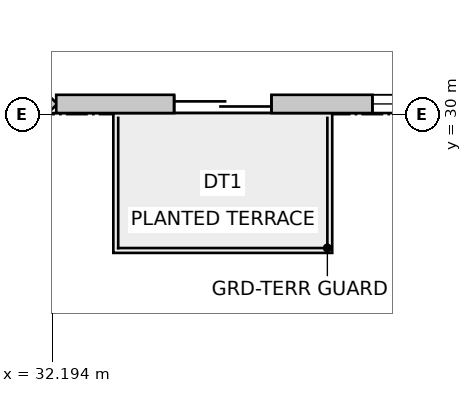
"""IFC4 building model, lengths in metres.
Left out: names, types, materials, properties, quantities, classifications, styles, units other than length and angle.
Written with IfcOpenShell. Run it as: python <this file> out.ifc"""

import sys

from ifc_helpers import new_model, si_unit, direction, frame, frame_2d, origin, place, context, subcontext, project, spatial, rectangle, extrude, source, transform, mapped, element, fill, save


model = new_model("IFC4")
c1 = context("Model", 3, precision=1e-05, world=origin(), true_north=direction((0.0, 1.0)))
c2 = subcontext(c1, "Body", "Model", "MODEL_VIEW")
j1 = project(units=[si_unit("LENGTHUNIT", "METRE"), si_unit("PLANEANGLEUNIT", "RADIAN")], contexts=[c1])
p1 = place(None, origin())
s1 = spatial("IfcSite", under=j1, at=p1, CompositionType="ELEMENT")
p2 = place(p1, origin())
s2 = spatial("IfcBuilding", under=s1, at=p2, CompositionType="ELEMENT")
p3 = place(p2, frame((0.0, 0.0, 91.0)))
s3 = spatial("IfcBuildingStorey", under=s2, at=p3, CompositionType="ELEMENT", Elevation=91.0)
p4 = place(p3, frame((30.116, 28.228, 0.0), z_axis=(0.0, 0.0, 1.0), x_axis=(0.707064797706, 0.707148762175, 0.0)))
e1 = element("IfcWall", 1, at=p4, inside=s3, PredefinedType="SOLIDWALL", context=c2, shape_type="SweptSolid", body=[
    extrude(rectangle(XDim=2.908, YDim=0.3, at=frame_2d((1.454, 0.0))), origin(), (0.0, 0.0, 1.0), 3.75),
])
m1 = source(origin(), c2, "Body", "SweptSolid", [
    extrude(rectangle(XDim=1.8, YDim=2.1, at=frame_2d((0.9, 1.05))), frame((0.0, 0.16, 0.0), z_axis=(0.0, -1.0, 0.0), x_axis=(1.0, 0.0, 0.0)), (0.0, 0.0, 1.0), 0.32),
])
p5 = place(p4, frame((0.554, 0.0, 0.85)))
e2 = element("IfcOpeningElement", 2, at=p5, cuts=e1, PredefinedType="OPENING", context=c2, shape_type="MappedRepresentation", body=[
    mapped(m1, transform((0.0, 0.0, 0.0), scale=1.0)),
])
p6 = place(p3, frame((32.261, 30.178, 0.0), z_axis=(0.0, 0.0, 1.0), x_axis=(1.0, 0.0, 0.0)))
e3 = element("IfcWall", 3, at=p6, inside=s3, PredefinedType="SOLIDWALL", context=c2, shape_type="SweptSolid", body=[
    extrude(rectangle(XDim=20.827, YDim=0.3, at=frame_2d((10.414, 0.0))), origin(), (0.0, 0.0, 1.0), 3.75),
])
m2 = source(origin(), c2, "Body", "SweptSolid", [
    extrude(rectangle(XDim=1.6, YDim=2.15, at=frame_2d((0.8, 1.075))), frame((0.0, 0.16, 0.0), z_axis=(0.0, -1.0, 0.0), x_axis=(1.0, 0.0, 0.0)), (0.0, 0.0, 1.0), 0.32),
])
p7 = place(p6, frame((1.939, 0.0, 0.0)))
e4 = element("IfcOpeningElement", 4, at=p7, cuts=e3, PredefinedType="OPENING", context=c2, shape_type="MappedRepresentation", body=[
    mapped(m2, transform((0.0, 0.0, 0.0), scale=1.0)),
])
m3 = source(origin(), c2, "Body", "SweptSolid", [
    extrude(rectangle(XDim=2.8, YDim=2.4, at=frame_2d((1.4, 1.2))), frame((0.0, 0.16, 0.0), z_axis=(0.0, -1.0, 0.0), x_axis=(1.0, 0.0, 0.0)), (0.0, 0.0, 1.0), 0.32),
])
p8 = place(p6, frame((5.2, 0.0, 0.85)))
e5 = element("IfcOpeningElement", 5, at=p8, cuts=e3, PredefinedType="OPENING", context=c2, shape_type="MappedRepresentation", body=[
    mapped(m3, transform((0.0, 0.0, 0.0), scale=1.0)),
])
m4 = source(origin(), c2, "Body", "SweptSolid", [
    extrude(rectangle(XDim=2.4, YDim=2.2, at=frame_2d((1.2, 1.1))), frame((0.0, 0.16, 0.0), z_axis=(0.0, -1.0, 0.0), x_axis=(1.0, 0.0, 0.0)), (0.0, 0.0, 1.0), 0.32),
])
p9 = place(p6, frame((10.963, 0.0, 0.85)))
e6 = element("IfcOpeningElement", 6, at=p9, cuts=e3, PredefinedType="OPENING", context=c2, shape_type="MappedRepresentation", body=[
    mapped(m4, transform((0.0, 0.0, 0.0), scale=1.0)),
])
p10 = place(p6, frame((16.326, 0.0, 0.85)))
e7 = element("IfcOpeningElement", 7, at=p10, cuts=e3, PredefinedType="OPENING", context=c2, shape_type="MappedRepresentation", body=[
    mapped(m3, transform((0.0, 0.0, 0.0), scale=1.0)),
])
m5 = source(origin(), c2, "Body", "SweptSolid", [
    extrude(rectangle(XDim=1.6, YDim=2.15, at=frame_2d((0.8, 1.075))), frame((0.0, 0.025, 0.0), z_axis=(0.0, -1.0, 0.0), x_axis=(1.0, 0.0, 0.0)), (0.0, 0.0, 1.0), 0.05),
])
p11 = place(p7, origin())
e8 = element("IfcDoor", 8, at=p11, inside=s3, OperationType="DOUBLE_DOOR_SLIDING", PredefinedType="DOOR", context=c2, shape_type="MappedRepresentation", body=[
    mapped(m5, transform((0.0, 0.0, 0.0), scale=1.0)),
])
fill(e4, e8)
m6 = source(origin(), c2, "Body", "SweptSolid", [
    extrude(rectangle(XDim=2.8, YDim=2.4, at=frame_2d((1.4, 1.2))), frame((0.0, -0.015, 0.0), z_axis=(0.0, -1.0, 0.0), x_axis=(1.0, 0.0, 0.0)), (0.0, 0.0, 1.0), 0.06),
])
p12 = place(p8, origin())
e9 = element("IfcWindow", 9, at=p12, inside=s3, PartitioningType="SINGLE_PANEL", PredefinedType="WINDOW", context=c2, shape_type="MappedRepresentation", body=[
    mapped(m6, transform((0.0, 0.0, 0.0), scale=1.0)),
])
fill(e5, e9)
save(model, sys.argv[1])
